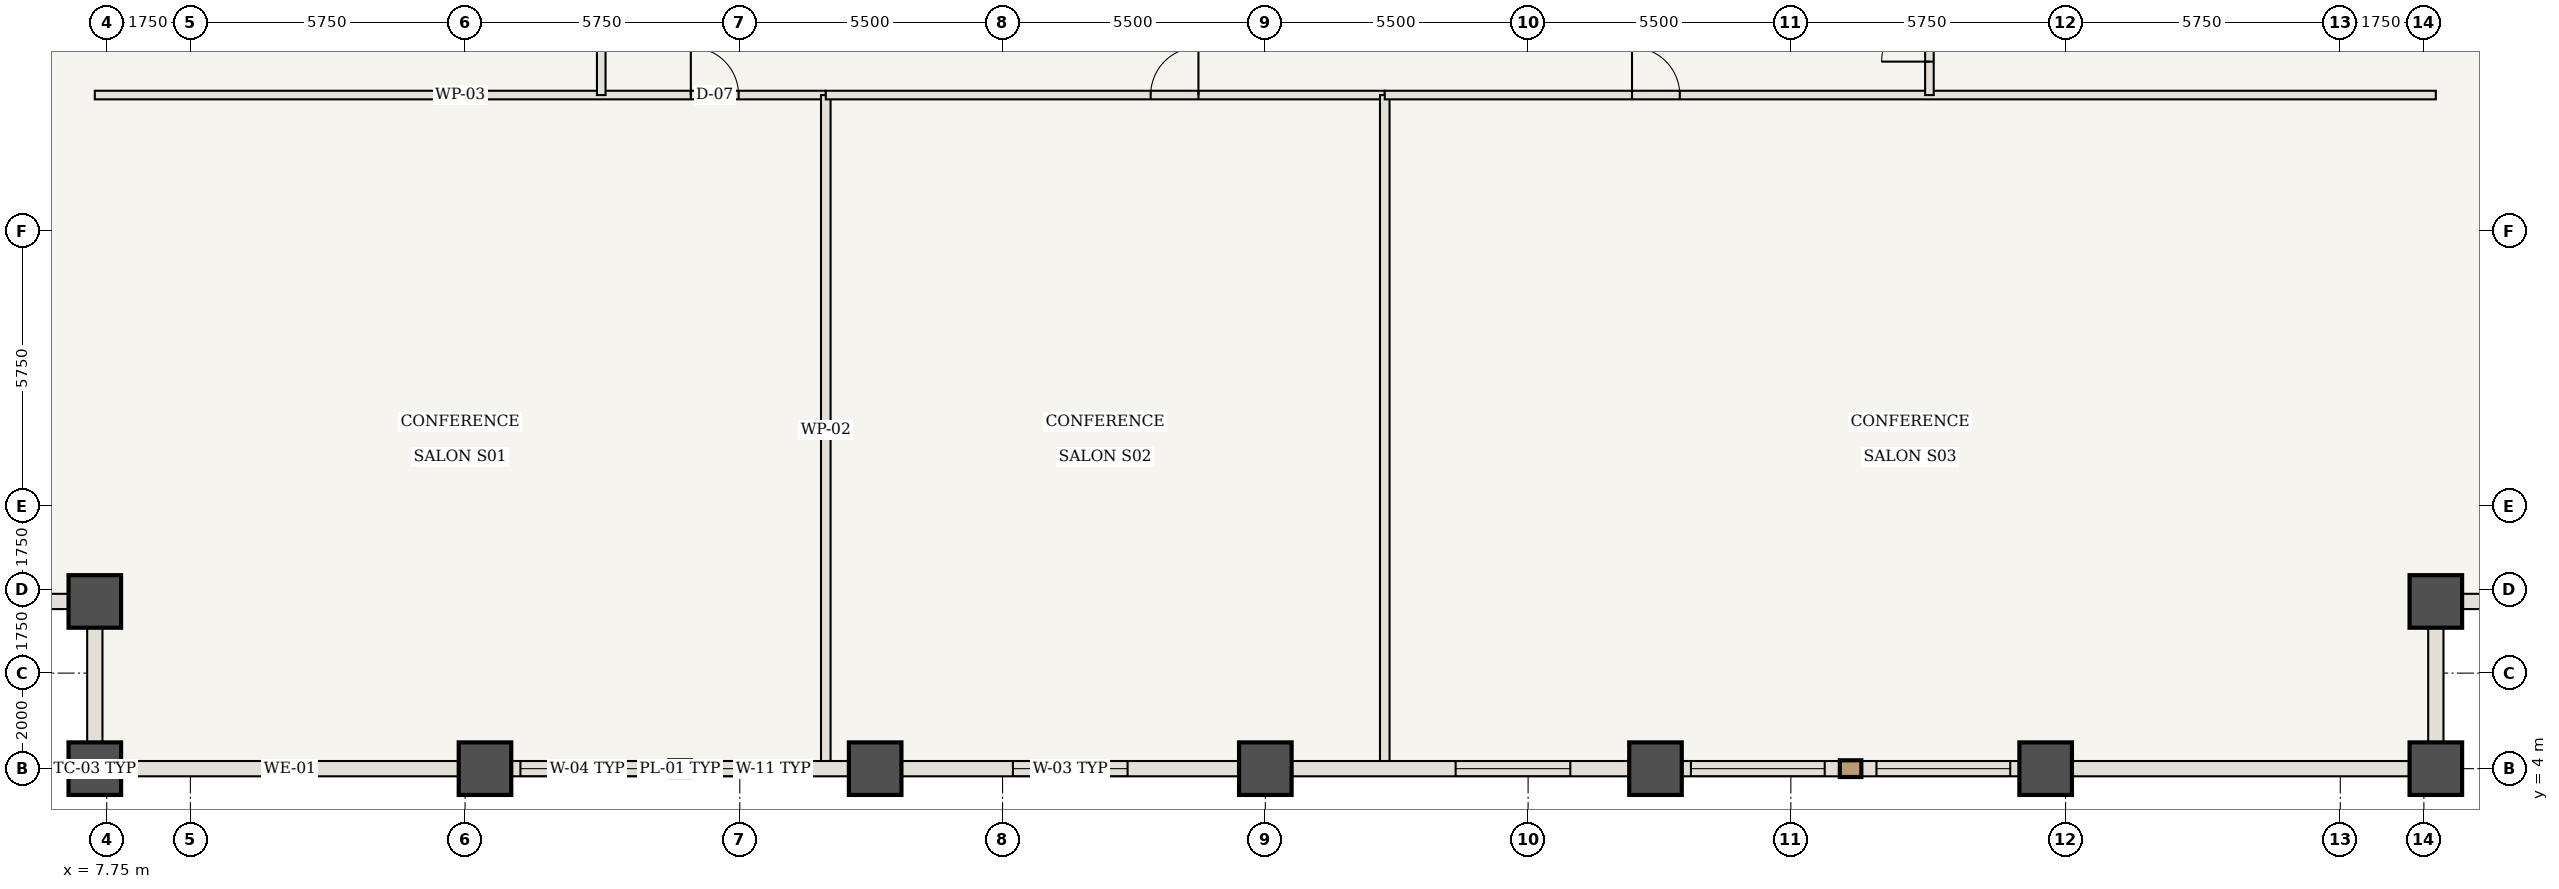
"""IFC4 building model, lengths in metres.
Left out: names, types, materials, properties, quantities, classifications, styles, units other than length and angle.
Written with IfcOpenShell. Run it as: python <this file> out.ifc"""

import sys

from ifc_helpers import new_model, si_unit, direction, frame, frame_2d, origin, origin_2d, place, context, subcontext, project, spatial, rectangle, extrude, element, fill, save


model = new_model("IFC4")
c1 = context("Model", 3, precision=1e-05, world=origin(), true_north=direction((0.0, 1.0)))
c2 = subcontext(c1, "Body", "Model", "MODEL_VIEW")
j1 = project(units=[si_unit("LENGTHUNIT", "METRE"), si_unit("PLANEANGLEUNIT", "RADIAN")], contexts=[c1])
p1 = place(None, origin())
s1 = spatial("IfcSite", under=j1, at=p1, CompositionType="ELEMENT")
p2 = place(p1, origin())
s2 = spatial("IfcBuilding", under=s1, at=p2, CompositionType="ELEMENT")
p3 = place(p2, frame((0.0, 0.0, 56.35)))
s3 = spatial("IfcBuildingStorey", under=s2, at=p3, CompositionType="ELEMENT", Elevation=56.35)
for number, where, z_axis, x_axis in (
    (1, (7.5, 4.0, 0.0), (0.0, 0.0, 1.0), (1.0, 0.0, 0.0)),
    (2, (7.5, 7.5, 0.0), (0.0, 0.0, 1.0), (1.0, 0.0, 0.0)),
    (3, (56.5, 4.0, 0.0), (0.0, 0.0, 1.0), (1.0, 0.0, 0.0)),
    (4, (56.5, 7.5, 0.0), (0.0, 0.0, 1.0), (1.0, 0.0, 0.0)),
    (5, (15.667, 4.0, 0.0), (0.0, 0.0, 1.0), (1.0, 0.0, 0.0)),
    (6, (23.833, 4.0, 0.0), (0.0, 0.0, 1.0), (1.0, 0.0, 0.0)),
    (7, (32.0, 4.0, 0.0), (0.0, 0.0, 1.0), (1.0, 0.0, 0.0)),
    (8, (40.167, 4.0, 0.0), (0.0, 0.0, 1.0), (1.0, 0.0, 0.0)),
    (9, (48.333, 4.0, 0.0), (0.0, 0.0, 1.0), (1.0, 0.0, 0.0)),
):
    element("IfcColumn", number, at=place(p3, frame(where, z_axis=z_axis, x_axis=x_axis)), inside=s3, PredefinedType="COLUMN", context=c2, shape_type="SweptSolid", body=[
        extrude(rectangle(XDim=1.1, YDim=1.1, at=origin_2d()), origin(), (0.0, 0.0, 1.0), 3.5),
    ])
p4 = place(p3, frame((7.5, 18.1, 0.0), z_axis=(0.0, 0.0, 1.0), x_axis=(1.0, 0.0, 0.0)))
e10 = element("IfcWall", 10, at=p4, inside=s3, PredefinedType="STANDARD", context=c2, shape_type="SweptSolid", body=[
    extrude(rectangle(XDim=15.3, YDim=0.18, at=frame_2d((7.65, 0.0))), origin(), (0.0, 0.0, 1.0), 3.32),
])
p5 = place(p4, frame((12.475, 0.0, 0.0)))
e11 = element("IfcOpeningElement", 11, at=p5, cuts=e10, PredefinedType="OPENING", context=c2, shape_type="SweptSolid", body=[
    extrude(rectangle(XDim=1.0, YDim=2.15, at=frame_2d((0.5, 1.075))), frame((0.0, 0.1, 0.0), z_axis=(0.0, -1.0, 0.0), x_axis=(1.0, 0.0, 0.0)), (0.0, 0.0, 1.0), 0.2),
])
p6 = place(p3, frame((22.8, 4.06, 0.0), z_axis=(0.0, 0.0, 1.0), x_axis=(0.0, 1.0, 0.0)))
e12 = element("IfcWall", 12, at=p6, inside=s3, PredefinedType="STANDARD", context=c2, shape_type="SweptSolid", body=[
    extrude(rectangle(XDim=14.04, YDim=0.2, at=frame_2d((7.02, 0.0))), origin(), (0.0, 0.0, 1.0), 3.32),
])
p7 = place(p3, frame((22.8, 18.1, 0.0), z_axis=(0.0, 0.0, 1.0), x_axis=(1.0, 0.0, 0.0)))
e13 = element("IfcWall", 13, at=p7, inside=s3, PredefinedType="STANDARD", context=c2, shape_type="SweptSolid", body=[
    extrude(rectangle(XDim=11.7, YDim=0.18, at=frame_2d((5.85, 0.0))), origin(), (0.0, 0.0, 1.0), 3.32),
])
p8 = place(p7, frame((6.8, 0.0, 0.0)))
e14 = element("IfcOpeningElement", 14, at=p8, cuts=e13, PredefinedType="OPENING", context=c2, shape_type="SweptSolid", body=[
    extrude(rectangle(XDim=1.0, YDim=2.15, at=frame_2d((0.5, 1.075))), frame((0.0, 0.1, 0.0), z_axis=(0.0, -1.0, 0.0), x_axis=(1.0, 0.0, 0.0)), (0.0, 0.0, 1.0), 0.2),
])
p9 = place(p3, frame((34.5, 4.06, 0.0), z_axis=(0.0, 0.0, 1.0), x_axis=(0.0, 1.0, 0.0)))
e15 = element("IfcWall", 15, at=p9, inside=s3, PredefinedType="STANDARD", context=c2, shape_type="SweptSolid", body=[
    extrude(rectangle(XDim=14.04, YDim=0.2, at=frame_2d((7.02, 0.0))), origin(), (0.0, 0.0, 1.0), 3.32),
])
p10 = place(p3, frame((34.5, 18.1, 0.0), z_axis=(0.0, 0.0, 1.0), x_axis=(1.0, 0.0, 0.0)))
e16 = element("IfcWall", 16, at=p10, inside=s3, PredefinedType="STANDARD", context=c2, shape_type="SweptSolid", body=[
    extrude(rectangle(XDim=22.0, YDim=0.18, at=frame_2d((11.0, 0.0))), origin(), (0.0, 0.0, 1.0), 3.32),
])
p11 = place(p10, frame((5.175, 0.0, 0.0)))
e17 = element("IfcOpeningElement", 17, at=p11, cuts=e16, PredefinedType="OPENING", context=c2, shape_type="SweptSolid", body=[
    extrude(rectangle(XDim=1.0, YDim=2.15, at=frame_2d((0.5, 1.075))), frame((0.0, 0.1, 0.0), z_axis=(0.0, -1.0, 0.0), x_axis=(1.0, 0.0, 0.0)), (0.0, 0.0, 1.0), 0.2),
])
p12 = place(p3, frame((18.1, 18.1, 0.0), z_axis=(0.0, 0.0, 1.0), x_axis=(0.0, 1.0, 0.0)))
e18 = element("IfcWall", 18, at=p12, inside=s3, PredefinedType="STANDARD", context=c2, shape_type="SweptSolid", body=[
    extrude(rectangle(XDim=10.9, YDim=0.18, at=frame_2d((5.45, 0.0))), origin(), (0.0, 0.0, 1.0), 3.32),
])
p13 = place(p12, frame((4.95, 0.0, 0.0)))
e19 = element("IfcOpeningElement", 19, at=p13, cuts=e18, PredefinedType="OPENING", context=c2, shape_type="SweptSolid", body=[
    extrude(rectangle(XDim=1.0, YDim=2.15, at=frame_2d((0.5, 1.075))), frame((0.0, 0.1, 0.0), z_axis=(0.0, -1.0, 0.0), x_axis=(1.0, 0.0, 0.0)), (0.0, 0.0, 1.0), 0.2),
])
p14 = place(p3, frame((45.9, 18.1, 0.0), z_axis=(0.0, 0.0, 1.0), x_axis=(0.0, 1.0, 0.0)))
e20 = element("IfcWall", 20, at=p14, inside=s3, PredefinedType="STANDARD", context=c2, shape_type="SweptSolid", body=[
    extrude(rectangle(XDim=5.3, YDim=0.18, at=frame_2d((2.65, 0.0))), origin(), (0.0, 0.0, 1.0), 3.32),
])
p15 = place(p14, frame((0.7, 0.0, 0.0)))
e21 = element("IfcOpeningElement", 21, at=p15, cuts=e20, PredefinedType="OPENING", context=c2, shape_type="SweptSolid", body=[
    extrude(rectangle(XDim=1.0, YDim=2.15, at=frame_2d((0.5, 1.075))), frame((0.0, 0.1, 0.0), z_axis=(0.0, -1.0, 0.0), x_axis=(1.0, 0.0, 0.0)), (0.0, 0.0, 1.0), 0.2),
])
p16 = place(p3, frame((15.667, 4.0, 0.0), z_axis=(0.0, 0.0, 1.0), x_axis=(-1.0, 0.0, 0.0)))
e22 = element("IfcWall", 22, at=p16, inside=s3, PredefinedType="USERDEFINED", context=c2, shape_type="SweptSolid", body=[
    extrude(rectangle(XDim=8.167, YDim=0.32, at=frame_2d((4.083, 0.0))), origin(), (0.0, 0.0, 1.0), 2.52),
])
p17 = place(p3, frame((23.833, 4.0, 0.0), z_axis=(0.0, 0.0, 1.0), x_axis=(-1.0, 0.0, 0.0)))
e23 = element("IfcWall", 23, at=p17, inside=s3, PredefinedType="USERDEFINED", context=c2, shape_type="SweptSolid", body=[
    extrude(rectangle(XDim=8.167, YDim=0.32, at=frame_2d((4.083, 0.0))), origin(), (0.0, 0.0, 1.0), 2.52),
])
p18 = place(p17, frame((1.708, 0.0, 0.85)))
e24 = element("IfcOpeningElement", 24, at=p18, cuts=e23, PredefinedType="OPENING", context=c2, shape_type="SweptSolid", body=[
    extrude(rectangle(XDim=1.6, YDim=1.47, at=frame_2d((0.8, 0.735))), frame((0.0, 0.17, 0.0), z_axis=(0.0, -1.0, 0.0), x_axis=(1.0, 0.0, 0.0)), (0.0, 0.0, 1.0), 0.34),
])
p19 = place(p17, frame((4.625, 0.0, 0.85)))
e25 = element("IfcOpeningElement", 25, at=p19, cuts=e23, PredefinedType="OPENING", context=c2, shape_type="SweptSolid", body=[
    extrude(rectangle(XDim=2.8, YDim=1.47, at=frame_2d((1.4, 0.735))), frame((0.0, 0.17, 0.0), z_axis=(0.0, -1.0, 0.0), x_axis=(1.0, 0.0, 0.0)), (0.0, 0.0, 1.0), 0.34),
])
p20 = place(p3, frame((32.0, 4.0, 0.0), z_axis=(0.0, 0.0, 1.0), x_axis=(-1.0, 0.0, 0.0)))
e26 = element("IfcWall", 26, at=p20, inside=s3, PredefinedType="USERDEFINED", context=c2, shape_type="SweptSolid", body=[
    extrude(rectangle(XDim=8.167, YDim=0.32, at=frame_2d((4.083, 0.0))), origin(), (0.0, 0.0, 1.0), 2.52),
])
p21 = place(p20, frame((2.883, 0.0, 0.85)))
e27 = element("IfcOpeningElement", 27, at=p21, cuts=e26, PredefinedType="OPENING", context=c2, shape_type="SweptSolid", body=[
    extrude(rectangle(XDim=2.4, YDim=1.47, at=frame_2d((1.2, 0.735))), frame((0.0, 0.17, 0.0), z_axis=(0.0, -1.0, 0.0), x_axis=(1.0, 0.0, 0.0)), (0.0, 0.0, 1.0), 0.34),
])
p22 = place(p3, frame((40.167, 4.0, 0.0), z_axis=(0.0, 0.0, 1.0), x_axis=(-1.0, 0.0, 0.0)))
e28 = element("IfcWall", 28, at=p22, inside=s3, PredefinedType="USERDEFINED", context=c2, shape_type="SweptSolid", body=[
    extrude(rectangle(XDim=8.167, YDim=0.32, at=frame_2d((4.083, 0.0))), origin(), (0.0, 0.0, 1.0), 2.52),
])
p23 = place(p22, frame((1.783, 0.0, 0.85)))
e29 = element("IfcOpeningElement", 29, at=p23, cuts=e28, PredefinedType="OPENING", context=c2, shape_type="SweptSolid", body=[
    extrude(rectangle(XDim=2.4, YDim=1.47, at=frame_2d((1.2, 0.735))), frame((0.0, 0.17, 0.0), z_axis=(0.0, -1.0, 0.0), x_axis=(1.0, 0.0, 0.0)), (0.0, 0.0, 1.0), 0.34),
])
p24 = place(p3, frame((48.333, 4.0, 0.0), z_axis=(0.0, 0.0, 1.0), x_axis=(-1.0, 0.0, 0.0)))
e30 = element("IfcWall", 30, at=p24, inside=s3, PredefinedType="USERDEFINED", context=c2, shape_type="SweptSolid", body=[
    extrude(rectangle(XDim=8.167, YDim=0.32, at=frame_2d((4.083, 0.0))), origin(), (0.0, 0.0, 1.0), 2.52),
])
p25 = place(p24, frame((0.742, 0.0, 0.85)))
e31 = element("IfcOpeningElement", 31, at=p25, cuts=e30, PredefinedType="OPENING", context=c2, shape_type="SweptSolid", body=[
    extrude(rectangle(XDim=2.8, YDim=1.47, at=frame_2d((1.4, 0.735))), frame((0.0, 0.17, 0.0), z_axis=(0.0, -1.0, 0.0), x_axis=(1.0, 0.0, 0.0)), (0.0, 0.0, 1.0), 0.34),
])
p26 = place(p24, frame((4.625, 0.0, 0.85)))
e32 = element("IfcOpeningElement", 32, at=p26, cuts=e30, PredefinedType="OPENING", context=c2, shape_type="SweptSolid", body=[
    extrude(rectangle(XDim=2.8, YDim=1.47, at=frame_2d((1.4, 0.735))), frame((0.0, 0.17, 0.0), z_axis=(0.0, -1.0, 0.0), x_axis=(1.0, 0.0, 0.0)), (0.0, 0.0, 1.0), 0.34),
])
p27 = place(p3, frame((56.5, 4.0, 0.0), z_axis=(0.0, 0.0, 1.0), x_axis=(-1.0, 0.0, 0.0)))
e33 = element("IfcWall", 33, at=p27, inside=s3, PredefinedType="USERDEFINED", context=c2, shape_type="SweptSolid", body=[
    extrude(rectangle(XDim=8.167, YDim=0.32, at=frame_2d((4.083, 0.0))), origin(), (0.0, 0.0, 1.0), 2.52),
])
for number, where, z_axis, x_axis in (
    (34, (7.5, 4.0, 0.0), (0.0, 0.0, 1.0), (0.0, 1.0, 0.0)),
    (35, (7.5, 7.5, 0.0), (0.0, 0.0, 1.0), (-1.0, 0.0, 0.0)),
    (36, (56.5, 7.5, 0.0), (0.0, 0.0, 1.0), (0.0, -1.0, 0.0)),
    (37, (60.0, 7.5, 0.0), (0.0, 0.0, 1.0), (-1.0, 0.0, 0.0)),
):
    element("IfcWall", number, at=place(p3, frame(where, z_axis=z_axis, x_axis=x_axis)), inside=s3, PredefinedType="USERDEFINED", context=c2, shape_type="SweptSolid", body=[
        extrude(rectangle(XDim=3.5, YDim=0.32, at=frame_2d((1.75, 0.0))), origin(), (0.0, 0.0, 1.0), 2.52),
    ])
p28 = place(p5, origin())
e38 = element("IfcDoor", 38, at=p28, inside=s3, OperationType="SINGLE_SWING_LEFT", PredefinedType="DOOR", context=c2, shape_type="SweptSolid", body=[
    extrude(rectangle(XDim=1.0, YDim=2.15, at=frame_2d((0.5, 1.075))), frame((0.0, 0.025, 0.0), z_axis=(0.0, -1.0, 0.0), x_axis=(1.0, 0.0, 0.0)), (0.0, 0.0, 1.0), 0.05),
])
fill(e11, e38)
p29 = place(p8, origin())
e39 = element("IfcDoor", 39, at=p29, inside=s3, OperationType="SINGLE_SWING_RIGHT", PredefinedType="DOOR", context=c2, shape_type="SweptSolid", body=[
    extrude(rectangle(XDim=1.0, YDim=2.15, at=frame_2d((0.5, 1.075))), frame((0.0, 0.025, 0.0), z_axis=(0.0, -1.0, 0.0), x_axis=(1.0, 0.0, 0.0)), (0.0, 0.0, 1.0), 0.05),
])
fill(e14, e39)
p30 = place(p11, origin())
e40 = element("IfcDoor", 40, at=p30, inside=s3, OperationType="SINGLE_SWING_LEFT", PredefinedType="DOOR", context=c2, shape_type="SweptSolid", body=[
    extrude(rectangle(XDim=1.0, YDim=2.15, at=frame_2d((0.5, 1.075))), frame((0.0, 0.025, 0.0), z_axis=(0.0, -1.0, 0.0), x_axis=(1.0, 0.0, 0.0)), (0.0, 0.0, 1.0), 0.05),
])
fill(e17, e40)
p31 = place(p15, origin())
e41 = element("IfcDoor", 41, at=p31, inside=s3, OperationType="SINGLE_SWING_LEFT", PredefinedType="DOOR", context=c2, shape_type="SweptSolid", body=[
    extrude(rectangle(XDim=1.0, YDim=2.15, at=frame_2d((0.5, 1.075))), frame((0.0, 0.025, 0.0), z_axis=(0.0, -1.0, 0.0), x_axis=(1.0, 0.0, 0.0)), (0.0, 0.0, 1.0), 0.05),
])
fill(e21, e41)
p32 = place(p18, origin())
e42 = element("IfcWindow", 42, at=p32, inside=s3, PartitioningType="SINGLE_PANEL", PredefinedType="WINDOW", context=c2, shape_type="SweptSolid", body=[
    extrude(rectangle(XDim=1.6, YDim=1.47, at=frame_2d((0.8, 0.735))), frame((0.0, 0.03, 0.0), z_axis=(0.0, -1.0, 0.0), x_axis=(1.0, 0.0, 0.0)), (0.0, 0.0, 1.0), 0.06),
])
fill(e24, e42)
p33 = place(p19, origin())
e43 = element("IfcWindow", 43, at=p33, inside=s3, PartitioningType="SINGLE_PANEL", PredefinedType="WINDOW", context=c2, shape_type="SweptSolid", body=[
    extrude(rectangle(XDim=2.8, YDim=1.47, at=frame_2d((1.4, 0.735))), frame((0.0, 0.03, 0.0), z_axis=(0.0, -1.0, 0.0), x_axis=(1.0, 0.0, 0.0)), (0.0, 0.0, 1.0), 0.06),
])
fill(e25, e43)
p34 = place(p21, origin())
e44 = element("IfcWindow", 44, at=p34, inside=s3, PartitioningType="SINGLE_PANEL", PredefinedType="WINDOW", context=c2, shape_type="SweptSolid", body=[
    extrude(rectangle(XDim=2.4, YDim=1.47, at=frame_2d((1.2, 0.735))), frame((0.0, 0.03, 0.0), z_axis=(0.0, -1.0, 0.0), x_axis=(1.0, 0.0, 0.0)), (0.0, 0.0, 1.0), 0.06),
])
fill(e27, e44)
p35 = place(p23, origin())
e45 = element("IfcWindow", 45, at=p35, inside=s3, PartitioningType="SINGLE_PANEL", PredefinedType="WINDOW", context=c2, shape_type="SweptSolid", body=[
    extrude(rectangle(XDim=2.4, YDim=1.47, at=frame_2d((1.2, 0.735))), frame((0.0, 0.03, 0.0), z_axis=(0.0, -1.0, 0.0), x_axis=(1.0, 0.0, 0.0)), (0.0, 0.0, 1.0), 0.06),
])
fill(e29, e45)
p36 = place(p25, origin())
e46 = element("IfcWindow", 46, at=p36, inside=s3, PartitioningType="SINGLE_PANEL", PredefinedType="WINDOW", context=c2, shape_type="SweptSolid", body=[
    extrude(rectangle(XDim=2.8, YDim=1.47, at=frame_2d((1.4, 0.735))), frame((0.0, 0.03, 0.0), z_axis=(0.0, -1.0, 0.0), x_axis=(1.0, 0.0, 0.0)), (0.0, 0.0, 1.0), 0.06),
])
fill(e31, e46)
p37 = place(p26, origin())
e47 = element("IfcWindow", 47, at=p37, inside=s3, PartitioningType="SINGLE_PANEL", PredefinedType="WINDOW", context=c2, shape_type="SweptSolid", body=[
    extrude(rectangle(XDim=2.8, YDim=1.47, at=frame_2d((1.4, 0.735))), frame((0.0, 0.03, 0.0), z_axis=(0.0, -1.0, 0.0), x_axis=(1.0, 0.0, 0.0)), (0.0, 0.0, 1.0), 0.06),
])
fill(e32, e47)
save(model, sys.argv[1])
